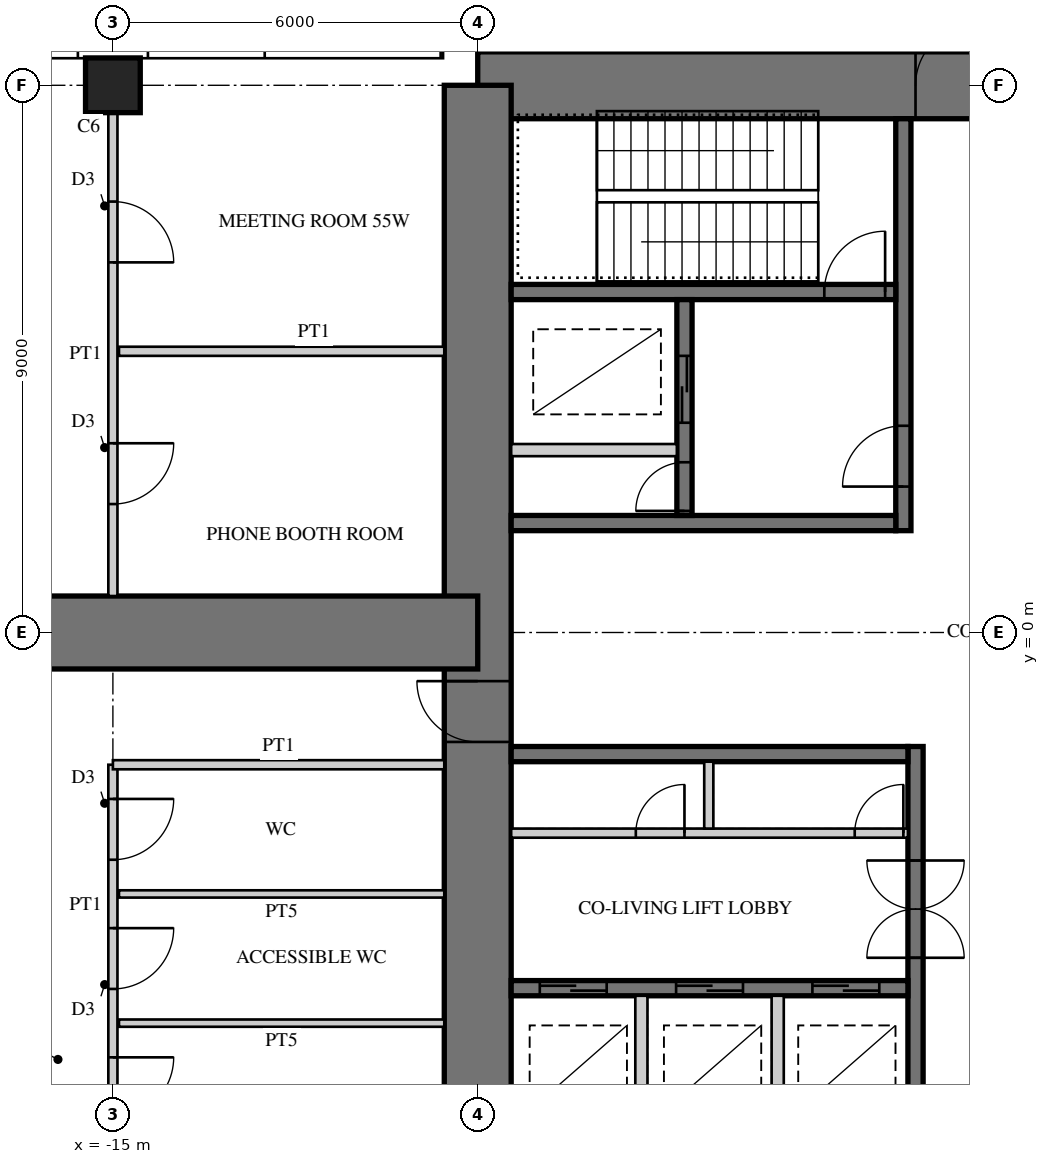
"""IFC4 building model, lengths in metres.
Left out: names, types, materials, properties, quantities, classifications, styles, units other than length and angle.
Written with IfcOpenShell. Run it as: python <this file> out.ifc"""

import sys

from ifc_helpers import new_model, si_unit, direction, frame, frame_2d, origin, origin_2d, place, context, subcontext, project, spatial, rectangle, extrude, element, fill, save


model = new_model("IFC4")
c1 = context("Model", 3, precision=1e-05, world=origin(), true_north=direction((0.0, 1.0)))
c2 = subcontext(c1, "Body", "Model", "MODEL_VIEW")
j1 = project(units=[si_unit("LENGTHUNIT", "METRE"), si_unit("PLANEANGLEUNIT", "RADIAN")], contexts=[c1])
p1 = place(None, origin())
s1 = spatial("IfcSite", under=j1, at=p1, CompositionType="ELEMENT")
p2 = place(p1, origin())
s2 = spatial("IfcBuilding", under=s1, at=p2, CompositionType="ELEMENT")
p3 = place(p2, frame((0.0, 0.0, 217.1)))
s3 = spatial("IfcBuildingStorey", under=s2, at=p3, CompositionType="ELEMENT", Elevation=217.1)
p4 = place(p3, frame((9.0, 9.0, 0.0), z_axis=(0.0, 0.0, 1.0), x_axis=(-1.0, 0.0, 0.0)))
e1 = element("IfcWall", 1, at=p4, inside=s3, PredefinedType="SHEAR", context=c2, shape_type="SweptSolid", body=[
    extrude(rectangle(XDim=18.0, YDim=1.1, at=frame_2d((9.0, 0.0))), origin(), (0.0, 0.0, 1.0), 5.0),
])
p5 = place(p4, frame((9.8, 0.0, 0.0)))
e2 = element("IfcOpeningElement", 2, at=p5, cuts=e1, PredefinedType="OPENING", context=c2, shape_type="SweptSolid", body=[
    extrude(rectangle(XDim=1.0, YDim=2.4, at=frame_2d((0.5, 1.2))), frame((0.0, 0.56, 0.0), z_axis=(0.0, -1.0, 0.0), x_axis=(1.0, 0.0, 0.0)), (0.0, 0.0, 1.0), 1.12),
])
p6 = place(p3, frame((-9.0, 9.0, 0.0), z_axis=(0.0, 0.0, 1.0), x_axis=(0.0, -1.0, 0.0)))
e3 = element("IfcWall", 3, at=p6, inside=s3, PredefinedType="SHEAR", context=c2, shape_type="SweptSolid", body=[
    extrude(rectangle(XDim=18.0, YDim=1.1, at=frame_2d((9.0, 0.0))), origin(), (0.0, 0.0, 1.0), 5.0),
])
p7 = place(p6, frame((9.8, 0.0, 0.0)))
e4 = element("IfcOpeningElement", 4, at=p7, cuts=e3, PredefinedType="OPENING", context=c2, shape_type="SweptSolid", body=[
    extrude(rectangle(XDim=1.0, YDim=2.4, at=frame_2d((0.5, 1.2))), frame((0.0, 0.56, 0.0), z_axis=(0.0, -1.0, 0.0), x_axis=(1.0, 0.0, 0.0)), (0.0, 0.0, 1.0), 1.12),
])
p8 = place(p3, frame((-2.0, 1.675, 0.0), z_axis=(0.0, 0.0, 1.0), x_axis=(0.0, 1.0, 0.0)))
e5 = element("IfcWall", 5, at=p8, inside=s3, PredefinedType="SHEAR", context=c2, shape_type="SweptSolid", body=[
    extrude(rectangle(XDim=6.775, YDim=0.25, at=frame_2d((3.387, 0.0))), origin(), (0.0, 0.0, 1.0), 5.0),
])
p9 = place(p8, frame((0.725, 0.0, 0.0)))
e6 = element("IfcOpeningElement", 6, at=p9, cuts=e5, PredefinedType="OPENING", context=c2, shape_type="SweptSolid", body=[
    extrude(rectangle(XDim=1.0, YDim=2.1, at=frame_2d((0.5, 1.05))), frame((0.0, 0.135, 0.0), z_axis=(0.0, -1.0, 0.0), x_axis=(1.0, 0.0, 0.0)), (0.0, 0.0, 1.0), 0.27),
])
p10 = place(p3, frame((-2.125, 1.8, 0.0), z_axis=(0.0, 0.0, 1.0), x_axis=(-1.0, 0.0, 0.0)))
e7 = element("IfcWall", 7, at=p10, inside=s3, PredefinedType="SHEAR", context=c2, shape_type="SweptSolid", body=[
    extrude(rectangle(XDim=6.325, YDim=0.25, at=frame_2d((3.163, 0.0))), origin(), (0.0, 0.0, 1.0), 5.0),
])
p11 = place(p3, frame((-2.125, 5.6, 0.0), z_axis=(0.0, 0.0, 1.0), x_axis=(-1.0, 0.0, 0.0)))
e8 = element("IfcWall", 8, at=p11, inside=s3, PredefinedType="SHEAR", context=c2, shape_type="SweptSolid", body=[
    extrude(rectangle(XDim=6.325, YDim=0.25, at=frame_2d((3.163, 0.0))), origin(), (0.0, 0.0, 1.0), 5.0),
])
p12 = place(p11, frame((0.175, 0.0, 0.0)))
e9 = element("IfcOpeningElement", 9, at=p12, cuts=e8, PredefinedType="OPENING", context=c2, shape_type="SweptSolid", body=[
    extrude(rectangle(XDim=1.0, YDim=2.1, at=frame_2d((0.5, 1.05))), frame((0.0, 0.135, 0.0), z_axis=(0.0, -1.0, 0.0), x_axis=(1.0, 0.0, 0.0)), (0.0, 0.0, 1.0), 0.27),
])
p13 = place(p3, frame((-5.6, 1.925, 0.0), z_axis=(0.0, 0.0, 1.0), x_axis=(0.0, 1.0, 0.0)))
e10 = element("IfcWall", 10, at=p13, inside=s3, PredefinedType="SHEAR", context=c2, shape_type="SweptSolid", body=[
    extrude(rectangle(XDim=3.55, YDim=0.25, at=frame_2d((1.775, 0.0))), origin(), (0.0, 0.0, 1.0), 5.0),
])
p14 = place(p13, frame((1.525, 0.0, 0.0)))
e11 = element("IfcOpeningElement", 11, at=p14, cuts=e10, PredefinedType="OPENING", context=c2, shape_type="SweptSolid", body=[
    extrude(rectangle(XDim=1.1, YDim=2.2, at=frame_2d((0.55, 1.1))), frame((0.0, 0.135, 0.0), z_axis=(0.0, -1.0, 0.0), x_axis=(1.0, 0.0, 0.0)), (0.0, 0.0, 1.0), 0.27),
])
p15 = place(p13, frame((0.075, 0.0, 0.0)))
e12 = element("IfcOpeningElement", 12, at=p15, cuts=e10, PredefinedType="OPENING", context=c2, shape_type="SweptSolid", body=[
    extrude(rectangle(XDim=0.8, YDim=2.1, at=frame_2d((0.4, 1.05))), frame((0.0, 0.135, 0.0), z_axis=(0.0, -1.0, 0.0), x_axis=(1.0, 0.0, 0.0)), (0.0, 0.0, 1.0), 0.27),
])
p16 = place(p3, frame((-5.725, 3.0, 0.0), z_axis=(0.0, 0.0, 1.0), x_axis=(-1.0, 0.0, 0.0)))
e13 = element("IfcWall", 13, at=p16, inside=s3, PredefinedType="PARTITIONING", context=c2, shape_type="SweptSolid", body=[
    extrude(rectangle(XDim=2.725, YDim=0.2, at=frame_2d((1.362, 0.0))), origin(), (0.0, 0.0, 1.0), 5.0),
])
p17 = place(p3, frame((-1.8, -1.875, 0.0), z_axis=(0.0, 0.0, 1.0), x_axis=(0.0, -1.0, 0.0)))
e14 = element("IfcWall", 14, at=p17, inside=s3, PredefinedType="SHEAR", context=c2, shape_type="SweptSolid", body=[
    extrude(rectangle(XDim=6.575, YDim=0.25, at=frame_2d((3.288, 0.0))), origin(), (0.0, 0.0, 1.0), 5.0),
])
p18 = place(p17, frame((1.875, 0.0, 0.0)))
e15 = element("IfcOpeningElement", 15, at=p18, cuts=e14, PredefinedType="OPENING", context=c2, shape_type="SweptSolid", body=[
    extrude(rectangle(XDim=1.6, YDim=2.4, at=frame_2d((0.8, 1.2))), frame((0.0, 0.135, 0.0), z_axis=(0.0, -1.0, 0.0), x_axis=(1.0, 0.0, 0.0)), (0.0, 0.0, 1.0), 0.27),
])
p19 = place(p3, frame((-1.925, -2.0, 0.0), z_axis=(0.0, 0.0, 1.0), x_axis=(-1.0, 0.0, 0.0)))
e16 = element("IfcWall", 16, at=p19, inside=s3, PredefinedType="SHEAR", context=c2, shape_type="SweptSolid", body=[
    extrude(rectangle(XDim=6.525, YDim=0.25, at=frame_2d((3.262, 0.0))), origin(), (0.0, 0.0, 1.0), 5.0),
])
p20 = place(p3, frame((-1.925, -5.85, 0.0), z_axis=(0.0, 0.0, 1.0), x_axis=(-1.0, 0.0, 0.0)))
e17 = element("IfcWall", 17, at=p20, inside=s3, PredefinedType="SHEAR", context=c2, shape_type="SweptSolid", body=[
    extrude(rectangle(XDim=6.525, YDim=0.25, at=frame_2d((3.262, 0.0))), origin(), (0.0, 0.0, 1.0), 5.0),
])
p21 = place(p20, frame((0.471, 0.0, 0.0)))
e18 = element("IfcOpeningElement", 18, at=p21, cuts=e17, PredefinedType="OPENING", context=c2, shape_type="SweptSolid", body=[
    extrude(rectangle(XDim=1.1, YDim=2.2, at=frame_2d((0.55, 1.1))), frame((0.0, 0.135, 0.0), z_axis=(0.0, -1.0, 0.0), x_axis=(1.0, 0.0, 0.0)), (0.0, 0.0, 1.0), 0.27),
])
p22 = place(p20, frame((2.712, 0.0, 0.0)))
e19 = element("IfcOpeningElement", 19, at=p22, cuts=e17, PredefinedType="OPENING", context=c2, shape_type="SweptSolid", body=[
    extrude(rectangle(XDim=1.1, YDim=2.2, at=frame_2d((0.55, 1.1))), frame((0.0, 0.135, 0.0), z_axis=(0.0, -1.0, 0.0), x_axis=(1.0, 0.0, 0.0)), (0.0, 0.0, 1.0), 0.27),
])
p23 = place(p20, frame((4.954, 0.0, 0.0)))
e20 = element("IfcOpeningElement", 20, at=p23, cuts=e17, PredefinedType="OPENING", context=c2, shape_type="SweptSolid", body=[
    extrude(rectangle(XDim=1.1, YDim=2.2, at=frame_2d((0.55, 1.1))), frame((0.0, 0.135, 0.0), z_axis=(0.0, -1.0, 0.0), x_axis=(1.0, 0.0, 0.0)), (0.0, 0.0, 1.0), 0.27),
])
p24 = place(p3, frame((-1.925, -3.3, 0.0), z_axis=(0.0, 0.0, 1.0), x_axis=(-1.0, 0.0, 0.0)))
e21 = element("IfcWall", 21, at=p24, inside=s3, PredefinedType="PARTITIONING", context=c2, shape_type="SweptSolid", body=[
    extrude(rectangle(XDim=6.525, YDim=0.15, at=frame_2d((3.262, 0.0))), origin(), (0.0, 0.0, 1.0), 5.0),
])
p25 = place(p24, frame((0.075, 0.0, 0.0)))
e22 = element("IfcOpeningElement", 22, at=p25, cuts=e21, PredefinedType="OPENING", context=c2, shape_type="SweptSolid", body=[
    extrude(rectangle(XDim=0.8, YDim=2.1, at=frame_2d((0.4, 1.05))), frame((0.0, 0.085, 0.0), z_axis=(0.0, -1.0, 0.0), x_axis=(1.0, 0.0, 0.0)), (0.0, 0.0, 1.0), 0.17),
])
p26 = place(p24, frame((3.675, 0.0, 0.0)))
e23 = element("IfcOpeningElement", 23, at=p26, cuts=e21, PredefinedType="OPENING", context=c2, shape_type="SweptSolid", body=[
    extrude(rectangle(XDim=0.8, YDim=2.1, at=frame_2d((0.4, 1.05))), frame((0.0, 0.085, 0.0), z_axis=(0.0, -1.0, 0.0), x_axis=(1.0, 0.0, 0.0)), (0.0, 0.0, 1.0), 0.17),
])
p27 = place(p3, frame((-5.2, -2.125, 0.0), z_axis=(0.0, 0.0, 1.0), x_axis=(0.0, -1.0, 0.0)))
e24 = element("IfcWall", 24, at=p27, inside=s3, PredefinedType="PARTITIONING", context=c2, shape_type="SweptSolid", body=[
    extrude(rectangle(XDim=1.1, YDim=0.15, at=frame_2d((0.55, 0.0))), origin(), (0.0, 0.0, 1.0), 5.0),
])
for number, where, z_axis, x_axis in (
    (25, (-4.067, -5.975, 0.0), (0.0, 0.0, 1.0), (0.0, -1.0, 0.0)),
    (26, (-6.308, -5.975, 0.0), (0.0, 0.0, 1.0), (0.0, -1.0, 0.0)),
):
    element("IfcWall", number, at=place(p3, frame(where, z_axis=z_axis, x_axis=x_axis)), inside=s3, PredefinedType="PARTITIONING", context=c2, shape_type="SweptSolid", body=[
        extrude(rectangle(XDim=2.475, YDim=0.2, at=frame_2d((1.237, 0.0))), origin(), (0.0, 0.0, 1.0), 5.0),
    ])
p28 = place(p3, frame((-9.0, 0.0, 0.0), z_axis=(0.0, 0.0, 1.0), x_axis=(-1.0, 0.0, 0.0)))
e27 = element("IfcWall", 27, at=p28, inside=s3, PredefinedType="SHEAR", context=c2, shape_type="SweptSolid", body=[
    extrude(rectangle(XDim=18.0, YDim=1.2, at=frame_2d((9.0, 0.0))), origin(), (0.0, 0.0, 1.0), 5.0),
])
p29 = place(p28, frame((9.75, 0.0, 0.0)))
e28 = element("IfcOpeningElement", 28, at=p29, cuts=e27, PredefinedType="OPENING", context=c2, shape_type="SweptSolid", body=[
    extrude(rectangle(XDim=1.0, YDim=2.2, at=frame_2d((0.5, 1.1))), frame((0.0, 0.61, 0.0), z_axis=(0.0, -1.0, 0.0), x_axis=(1.0, 0.0, 0.0)), (0.0, 0.0, 1.0), 1.22),
])
p30 = place(p3, frame((-15.0, 9.0, 0.0), z_axis=(0.0, 0.0, 1.0), x_axis=(1.0, 0.0, 0.0)))
e29 = element("IfcColumn", 29, at=p30, inside=s3, PredefinedType="COLUMN", context=c2, shape_type="SweptSolid", body=[
    extrude(rectangle(XDim=0.9, YDim=0.9, at=origin_2d()), origin(), (0.0, 0.0, 1.0), 5.0),
])
p31 = place(p3, frame((-15.0, -2.175, 0.0), z_axis=(0.0, 0.0, 1.0), x_axis=(0.0, -1.0, 0.0)))
e30 = element("IfcWall", 30, at=p31, inside=s3, PredefinedType="PARTITIONING", context=c2, shape_type="SweptSolid", body=[
    extrude(rectangle(XDim=6.375, YDim=0.15, at=frame_2d((3.188, 0.0))), origin(), (0.0, 0.0, 1.0), 4.07),
])
p32 = place(p31, frame((0.562, 0.0, 0.0)))
e31 = element("IfcOpeningElement", 31, at=p32, cuts=e30, PredefinedType="OPENING", context=c2, shape_type="SweptSolid", body=[
    extrude(rectangle(XDim=1.0, YDim=2.1, at=frame_2d((0.5, 1.05))), frame((0.0, 0.085, 0.0), z_axis=(0.0, -1.0, 0.0), x_axis=(1.0, 0.0, 0.0)), (0.0, 0.0, 1.0), 0.17),
])
p33 = place(p31, frame((2.688, 0.0, 0.0)))
e32 = element("IfcOpeningElement", 32, at=p33, cuts=e30, PredefinedType="OPENING", context=c2, shape_type="SweptSolid", body=[
    extrude(rectangle(XDim=1.0, YDim=2.1, at=frame_2d((0.5, 1.05))), frame((0.0, 0.085, 0.0), z_axis=(0.0, -1.0, 0.0), x_axis=(1.0, 0.0, 0.0)), (0.0, 0.0, 1.0), 0.17),
])
p34 = place(p31, frame((4.812, 0.0, 0.0)))
e33 = element("IfcOpeningElement", 33, at=p34, cuts=e30, PredefinedType="OPENING", context=c2, shape_type="SweptSolid", body=[
    extrude(rectangle(XDim=1.0, YDim=2.1, at=frame_2d((0.5, 1.05))), frame((0.0, 0.085, 0.0), z_axis=(0.0, -1.0, 0.0), x_axis=(1.0, 0.0, 0.0)), (0.0, 0.0, 1.0), 0.17),
])
p35 = place(p3, frame((-9.55, -2.175, 0.0), z_axis=(0.0, 0.0, 1.0), x_axis=(-1.0, 0.0, 0.0)))
e34 = element("IfcWall", 34, at=p35, inside=s3, PredefinedType="PARTITIONING", context=c2, shape_type="SweptSolid", body=[
    extrude(rectangle(XDim=5.45, YDim=0.15, at=frame_2d((2.725, 0.0))), origin(), (0.0, 0.0, 1.0), 4.82),
])
for number, where, z_axis, x_axis in (
    (35, (-9.55, -4.3, 0.0), (0.0, 0.0, 1.0), (-1.0, 0.0, 0.0)),
    (36, (-9.55, -6.425, 0.0), (0.0, 0.0, 1.0), (-1.0, 0.0, 0.0)),
):
    element("IfcWall", number, at=place(p3, frame(where, z_axis=z_axis, x_axis=x_axis)), inside=s3, PredefinedType="PLUMBINGWALL", context=c2, shape_type="SweptSolid", body=[
        extrude(rectangle(XDim=5.35, YDim=0.12, at=frame_2d((2.675, 0.0))), origin(), (0.0, 0.0, 1.0), 4.82),
    ])
p36 = place(p3, frame((-15.0, 8.55, 0.0), z_axis=(0.0, 0.0, 1.0), x_axis=(0.0, -1.0, 0.0)))
e37 = element("IfcWall", 37, at=p36, inside=s3, PredefinedType="PARTITIONING", context=c2, shape_type="SweptSolid", body=[
    extrude(rectangle(XDim=7.95, YDim=0.15, at=frame_2d((3.975, 0.0))), origin(), (0.0, 0.0, 1.0), 4.07),
])
p37 = place(p36, frame((1.462, 0.0, 0.0)))
e38 = element("IfcOpeningElement", 38, at=p37, cuts=e37, PredefinedType="OPENING", context=c2, shape_type="SweptSolid", body=[
    extrude(rectangle(XDim=1.0, YDim=2.1, at=frame_2d((0.5, 1.05))), frame((0.0, 0.085, 0.0), z_axis=(0.0, -1.0, 0.0), x_axis=(1.0, 0.0, 0.0)), (0.0, 0.0, 1.0), 0.17),
])
p38 = place(p36, frame((5.438, 0.0, 0.0)))
e39 = element("IfcOpeningElement", 39, at=p38, cuts=e37, PredefinedType="OPENING", context=c2, shape_type="SweptSolid", body=[
    extrude(rectangle(XDim=1.0, YDim=2.1, at=frame_2d((0.5, 1.05))), frame((0.0, 0.085, 0.0), z_axis=(0.0, -1.0, 0.0), x_axis=(1.0, 0.0, 0.0)), (0.0, 0.0, 1.0), 0.17),
])
p39 = place(p3, frame((-9.55, 4.625, 0.0), z_axis=(0.0, 0.0, 1.0), x_axis=(-1.0, 0.0, 0.0)))
e40 = element("IfcWall", 40, at=p39, inside=s3, PredefinedType="PARTITIONING", context=c2, shape_type="SweptSolid", body=[
    extrude(rectangle(XDim=5.35, YDim=0.15, at=frame_2d((2.675, 0.0))), origin(), (0.0, 0.0, 1.0), 4.82),
])
p40 = place(p32, origin())
e41 = element("IfcDoor", 41, at=p40, inside=s3, OperationType="SINGLE_SWING_LEFT", PredefinedType="DOOR", context=c2, shape_type="SweptSolid", body=[
    extrude(rectangle(XDim=1.0, YDim=2.1, at=frame_2d((0.5, 1.05))), frame((0.0, 0.025, 0.0), z_axis=(0.0, -1.0, 0.0), x_axis=(1.0, 0.0, 0.0)), (0.0, 0.0, 1.0), 0.05),
])
fill(e31, e41)
p41 = place(p33, origin())
e42 = element("IfcDoor", 42, at=p41, inside=s3, OperationType="SINGLE_SWING_LEFT", PredefinedType="DOOR", context=c2, shape_type="SweptSolid", body=[
    extrude(rectangle(XDim=1.0, YDim=2.1, at=frame_2d((0.5, 1.05))), frame((0.0, 0.025, 0.0), z_axis=(0.0, -1.0, 0.0), x_axis=(1.0, 0.0, 0.0)), (0.0, 0.0, 1.0), 0.05),
])
fill(e32, e42)
p42 = place(p34, origin())
e43 = element("IfcDoor", 43, at=p42, inside=s3, OperationType="SINGLE_SWING_LEFT", PredefinedType="DOOR", context=c2, shape_type="SweptSolid", body=[
    extrude(rectangle(XDim=1.0, YDim=2.1, at=frame_2d((0.5, 1.05))), frame((0.0, 0.025, 0.0), z_axis=(0.0, -1.0, 0.0), x_axis=(1.0, 0.0, 0.0)), (0.0, 0.0, 1.0), 0.05),
])
fill(e33, e43)
p43 = place(p37, origin())
e44 = element("IfcDoor", 44, at=p43, inside=s3, OperationType="SINGLE_SWING_RIGHT", PredefinedType="DOOR", context=c2, shape_type="SweptSolid", body=[
    extrude(rectangle(XDim=1.0, YDim=2.1, at=frame_2d((0.5, 1.05))), frame((0.0, 0.025, 0.0), z_axis=(0.0, -1.0, 0.0), x_axis=(1.0, 0.0, 0.0)), (0.0, 0.0, 1.0), 0.05),
])
fill(e38, e44)
p44 = place(p38, origin())
e45 = element("IfcDoor", 45, at=p44, inside=s3, OperationType="SINGLE_SWING_LEFT", PredefinedType="DOOR", context=c2, shape_type="SweptSolid", body=[
    extrude(rectangle(XDim=1.0, YDim=2.1, at=frame_2d((0.5, 1.05))), frame((0.0, 0.025, 0.0), z_axis=(0.0, -1.0, 0.0), x_axis=(1.0, 0.0, 0.0)), (0.0, 0.0, 1.0), 0.05),
])
fill(e39, e45)
p45 = place(p5, frame((1.0, 0.0, 0.0), z_axis=(0.0, 0.0, 1.0), x_axis=(-1.0, 0.0, 0.0)))
e46 = element("IfcDoor", 46, at=p45, inside=s3, OperationType="SINGLE_SWING_RIGHT", PredefinedType="DOOR", context=c2, shape_type="SweptSolid", body=[
    extrude(rectangle(XDim=1.0, YDim=2.4, at=frame_2d((0.5, 1.2))), frame((0.0, -0.005, 0.0), z_axis=(0.0, -1.0, 0.0), x_axis=(1.0, 0.0, 0.0)), (0.0, 0.0, 1.0), 0.05),
])
fill(e2, e46)
p46 = place(p7, frame((1.0, 0.0, 0.0), z_axis=(0.0, 0.0, 1.0), x_axis=(-1.0, 0.0, 0.0)))
e47 = element("IfcDoor", 47, at=p46, inside=s3, OperationType="SINGLE_SWING_RIGHT", PredefinedType="DOOR", context=c2, shape_type="SweptSolid", body=[
    extrude(rectangle(XDim=1.0, YDim=2.4, at=frame_2d((0.5, 1.2))), frame((0.0, -0.005, 0.0), z_axis=(0.0, -1.0, 0.0), x_axis=(1.0, 0.0, 0.0)), (0.0, 0.0, 1.0), 0.05),
])
fill(e4, e47)
p47 = place(p9, origin())
e48 = element("IfcDoor", 48, at=p47, inside=s3, OperationType="SINGLE_SWING_LEFT", PredefinedType="DOOR", context=c2, shape_type="SweptSolid", body=[
    extrude(rectangle(XDim=1.0, YDim=2.1, at=frame_2d((0.5, 1.05))), frame((0.0, 0.025, 0.0), z_axis=(0.0, -1.0, 0.0), x_axis=(1.0, 0.0, 0.0)), (0.0, 0.0, 1.0), 0.05),
])
fill(e6, e48)
p48 = place(p12, frame((1.0, 0.0, 0.0), z_axis=(0.0, 0.0, 1.0), x_axis=(-1.0, 0.0, 0.0)))
e49 = element("IfcDoor", 49, at=p48, inside=s3, OperationType="SINGLE_SWING_RIGHT", PredefinedType="DOOR", context=c2, shape_type="SweptSolid", body=[
    extrude(rectangle(XDim=1.0, YDim=2.1, at=frame_2d((0.5, 1.05))), frame((0.0, 0.025, 0.0), z_axis=(0.0, -1.0, 0.0), x_axis=(1.0, 0.0, 0.0)), (0.0, 0.0, 1.0), 0.05),
])
fill(e9, e49)
p49 = place(p14, origin())
e50 = element("IfcDoor", 50, at=p49, inside=s3, OperationType="DOUBLE_DOOR_SLIDING", PredefinedType="DOOR", context=c2, shape_type="SweptSolid", body=[
    extrude(rectangle(XDim=1.1, YDim=2.2, at=frame_2d((0.55, 1.1))), frame((0.0, 0.025, 0.0), z_axis=(0.0, -1.0, 0.0), x_axis=(1.0, 0.0, 0.0)), (0.0, 0.0, 1.0), 0.05),
])
fill(e11, e50)
p50 = place(p15, origin())
e51 = element("IfcDoor", 51, at=p50, inside=s3, OperationType="SINGLE_SWING_LEFT", PredefinedType="DOOR", context=c2, shape_type="SweptSolid", body=[
    extrude(rectangle(XDim=0.8, YDim=2.1, at=frame_2d((0.4, 1.05))), frame((0.0, 0.025, 0.0), z_axis=(0.0, -1.0, 0.0), x_axis=(1.0, 0.0, 0.0)), (0.0, 0.0, 1.0), 0.05),
])
fill(e12, e51)
p51 = place(p21, origin())
e52 = element("IfcDoor", 52, at=p51, inside=s3, OperationType="DOUBLE_DOOR_SLIDING", PredefinedType="DOOR", context=c2, shape_type="SweptSolid", body=[
    extrude(rectangle(XDim=1.1, YDim=2.2, at=frame_2d((0.55, 1.1))), frame((0.0, 0.025, 0.0), z_axis=(0.0, -1.0, 0.0), x_axis=(1.0, 0.0, 0.0)), (0.0, 0.0, 1.0), 0.05),
])
fill(e18, e52)
p52 = place(p22, origin())
e53 = element("IfcDoor", 53, at=p52, inside=s3, OperationType="DOUBLE_DOOR_SLIDING", PredefinedType="DOOR", context=c2, shape_type="SweptSolid", body=[
    extrude(rectangle(XDim=1.1, YDim=2.2, at=frame_2d((0.55, 1.1))), frame((0.0, 0.025, 0.0), z_axis=(0.0, -1.0, 0.0), x_axis=(1.0, 0.0, 0.0)), (0.0, 0.0, 1.0), 0.05),
])
fill(e19, e53)
p53 = place(p23, origin())
e54 = element("IfcDoor", 54, at=p53, inside=s3, OperationType="DOUBLE_DOOR_SLIDING", PredefinedType="DOOR", context=c2, shape_type="SweptSolid", body=[
    extrude(rectangle(XDim=1.1, YDim=2.2, at=frame_2d((0.55, 1.1))), frame((0.0, 0.025, 0.0), z_axis=(0.0, -1.0, 0.0), x_axis=(1.0, 0.0, 0.0)), (0.0, 0.0, 1.0), 0.05),
])
fill(e20, e54)
p54 = place(p18, origin())
e55 = element("IfcDoor", 55, at=p54, inside=s3, OperationType="DOUBLE_DOOR_DOUBLE_SWING", PredefinedType="DOOR", context=c2, shape_type="SweptSolid", body=[
    extrude(rectangle(XDim=1.6, YDim=2.4, at=frame_2d((0.8, 1.2))), frame((0.0, 0.025, 0.0), z_axis=(0.0, -1.0, 0.0), x_axis=(1.0, 0.0, 0.0)), (0.0, 0.0, 1.0), 0.05),
])
fill(e15, e55)
p55 = place(p25, frame((0.8, 0.0, 0.0), z_axis=(0.0, 0.0, 1.0), x_axis=(-1.0, 0.0, 0.0)))
e56 = element("IfcDoor", 56, at=p55, inside=s3, OperationType="SINGLE_SWING_RIGHT", PredefinedType="DOOR", context=c2, shape_type="SweptSolid", body=[
    extrude(rectangle(XDim=0.8, YDim=2.1, at=frame_2d((0.4, 1.05))), frame((0.0, 0.025, 0.0), z_axis=(0.0, -1.0, 0.0), x_axis=(1.0, 0.0, 0.0)), (0.0, 0.0, 1.0), 0.05),
])
fill(e22, e56)
p56 = place(p26, frame((0.8, 0.0, 0.0), z_axis=(0.0, 0.0, 1.0), x_axis=(-1.0, 0.0, 0.0)))
e57 = element("IfcDoor", 57, at=p56, inside=s3, OperationType="SINGLE_SWING_RIGHT", PredefinedType="DOOR", context=c2, shape_type="SweptSolid", body=[
    extrude(rectangle(XDim=0.8, YDim=2.1, at=frame_2d((0.4, 1.05))), frame((0.0, 0.025, 0.0), z_axis=(0.0, -1.0, 0.0), x_axis=(1.0, 0.0, 0.0)), (0.0, 0.0, 1.0), 0.05),
])
fill(e23, e57)
save(model, sys.argv[1])
